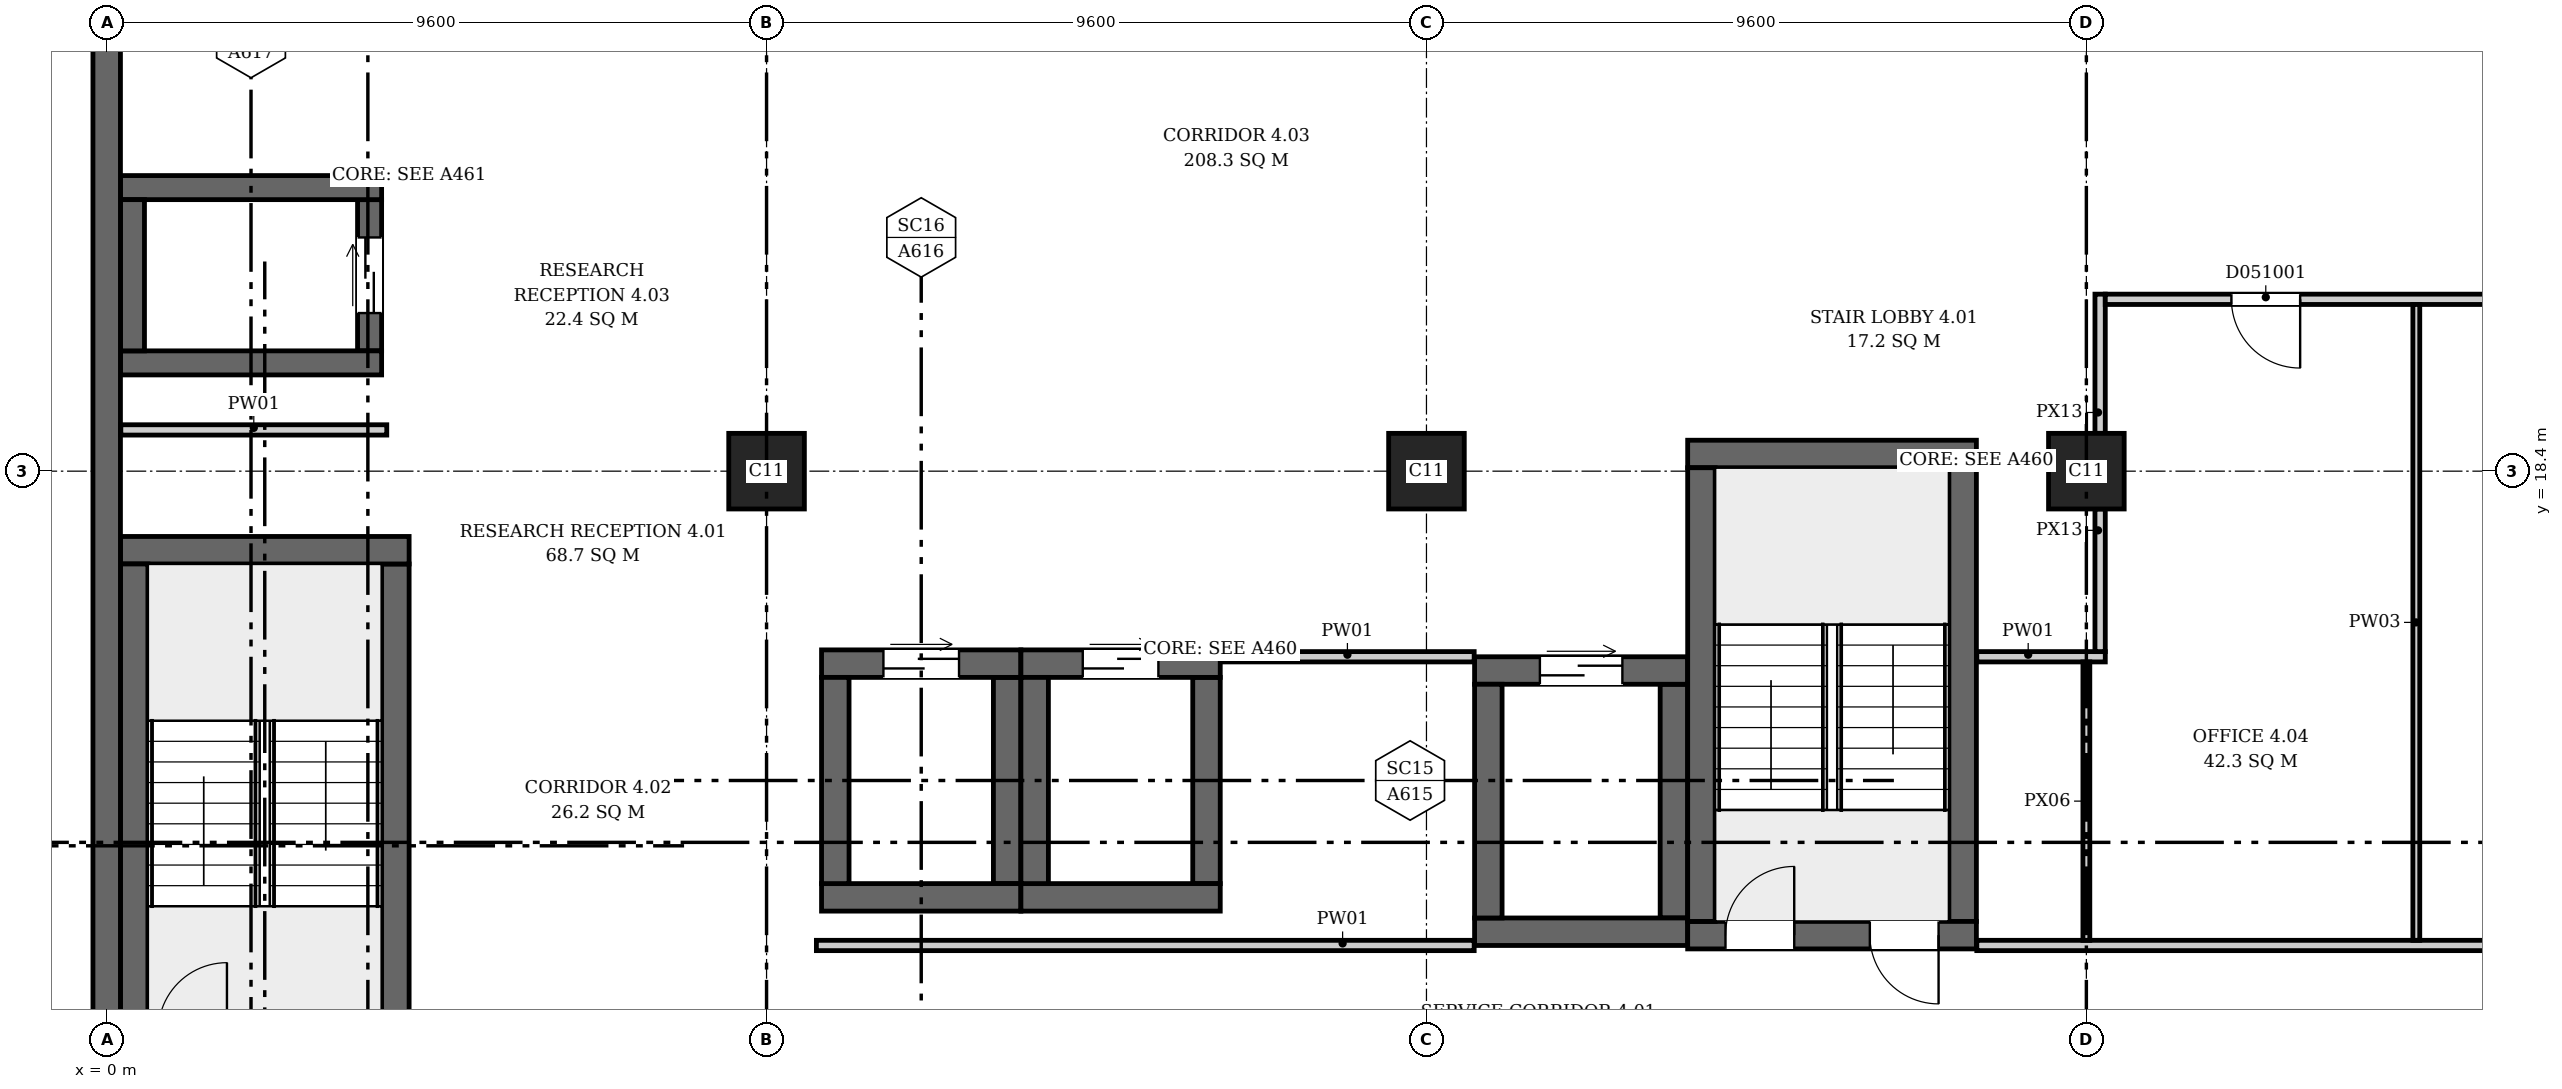
"""IFC4 building model, lengths in metres.
Left out: names, types, materials, properties, quantities, classifications, styles, units other than length and angle.
Written with IfcOpenShell. Run it as: python <this file> out.ifc"""

import sys

from ifc_helpers import new_model, si_unit, direction, frame, frame_2d, origin, origin_2d, place, context, subcontext, project, spatial, rectangle, extrude, element, fill, save


model = new_model("IFC4")
c1 = context("Model", 3, precision=1e-05, world=origin(), true_north=direction((0.0, 1.0)))
c2 = subcontext(c1, "Body", "Model", "MODEL_VIEW")
j1 = project(units=[si_unit("LENGTHUNIT", "METRE"), si_unit("PLANEANGLEUNIT", "RADIAN")], contexts=[c1])
p1 = place(None, origin())
s1 = spatial("IfcSite", under=j1, at=p1, CompositionType="ELEMENT")
p2 = place(p1, origin())
s2 = spatial("IfcBuilding", under=s1, at=p2, CompositionType="ELEMENT")
p3 = place(p2, frame((0.0, 0.0, 26.7)))
s3 = spatial("IfcBuildingStorey", under=s2, at=p3, CompositionType="ELEMENT", Elevation=26.7)
p4 = place(p3, frame((0.0, -0.2, 0.0), z_axis=(0.0, 0.0, 1.0), x_axis=(0.0, 1.0, 0.0)))
e1 = element("IfcWall", 1, at=p4, inside=s3, PredefinedType="SHEAR", context=c2, shape_type="SweptSolid", body=[
    extrude(rectangle(XDim=46.88, YDim=0.4, at=frame_2d((23.44, 0.0))), origin(), (0.0, 0.0, 1.0), 5.2),
])
p5 = place(p3, frame((0.2, 17.25, 0.0), z_axis=(0.0, 0.0, 1.0), x_axis=(1.0, 0.0, 0.0)))
e2 = element("IfcWall", 2, at=p5, inside=s3, PredefinedType="SHEAR", context=c2, shape_type="SweptSolid", body=[
    extrude(rectangle(XDim=4.2, YDim=0.4, at=frame_2d((2.1, 0.0))), origin(), (0.0, 0.0, 1.0), 5.2),
])
for number, where, z_axis, x_axis in (
    (3, (0.4, 10.45, 0.0), (0.0, 0.0, 1.0), (0.0, 1.0, 0.0)),
    (4, (4.2, 10.45, 0.0), (0.0, 0.0, 1.0), (0.0, 1.0, 0.0)),
):
    element("IfcWall", number, at=place(p3, frame(where, z_axis=z_axis, x_axis=x_axis)), inside=s3, PredefinedType="SHEAR", context=c2, shape_type="SweptSolid", body=[
        extrude(rectangle(XDim=6.6, YDim=0.4, at=frame_2d((3.3, 0.0))), origin(), (0.0, 0.0, 1.0), 5.2),
    ])
p6 = place(p3, frame((23.0, 11.65, 0.0), z_axis=(0.0, 0.0, 1.0), x_axis=(1.0, 0.0, 0.0)))
e5 = element("IfcWall", 5, at=p6, inside=s3, PredefinedType="SHEAR", context=c2, shape_type="SweptSolid", body=[
    extrude(rectangle(XDim=4.2, YDim=0.4, at=frame_2d((2.1, 0.0))), origin(), (0.0, 0.0, 1.0), 5.2),
])
p7 = place(p6, frame((0.55, 0.0, 0.0)))
e6 = element("IfcOpeningElement", 6, at=p7, cuts=e5, PredefinedType="OPENING", context=c2, shape_type="SweptSolid", body=[
    extrude(rectangle(XDim=1.0, YDim=2.1, at=frame_2d((0.5, 1.05))), frame((0.0, 0.21, 0.0), z_axis=(0.0, -1.0, 0.0), x_axis=(1.0, 0.0, 0.0)), (0.0, 0.0, 1.0), 0.42),
])
p8 = place(p6, frame((2.65, 0.0, 0.0)))
e7 = element("IfcOpeningElement", 7, at=p8, cuts=e5, PredefinedType="OPENING", context=c2, shape_type="SweptSolid", body=[
    extrude(rectangle(XDim=1.0, YDim=2.1, at=frame_2d((0.5, 1.05))), frame((0.0, 0.21, 0.0), z_axis=(0.0, -1.0, 0.0), x_axis=(1.0, 0.0, 0.0)), (0.0, 0.0, 1.0), 0.42),
])
p9 = place(p3, frame((23.0, 18.65, 0.0), z_axis=(0.0, 0.0, 1.0), x_axis=(1.0, 0.0, 0.0)))
e8 = element("IfcWall", 8, at=p9, inside=s3, PredefinedType="SHEAR", context=c2, shape_type="SweptSolid", body=[
    extrude(rectangle(XDim=4.2, YDim=0.4, at=frame_2d((2.1, 0.0))), origin(), (0.0, 0.0, 1.0), 5.2),
])
for number, where, z_axis, x_axis in (
    (9, (23.2, 11.85, 0.0), (0.0, 0.0, 1.0), (0.0, 1.0, 0.0)),
    (10, (27.0, 11.85, 0.0), (0.0, 0.0, 1.0), (0.0, 1.0, 0.0)),
):
    element("IfcWall", number, at=place(p3, frame(where, z_axis=z_axis, x_axis=x_axis)), inside=s3, PredefinedType="SHEAR", context=c2, shape_type="SweptSolid", body=[
        extrude(rectangle(XDim=6.6, YDim=0.4, at=frame_2d((3.3, 0.0))), origin(), (0.0, 0.0, 1.0), 5.2),
    ])
for number, where, z_axis, x_axis in (
    (11, (0.2, 19.975, 0.0), (0.0, 0.0, 1.0), (1.0, 0.0, 0.0)),
    (12, (0.2, 22.525, 0.0), (0.0, 0.0, 1.0), (1.0, 0.0, 0.0)),
):
    element("IfcWall", number, at=place(p3, frame(where, z_axis=z_axis, x_axis=x_axis)), inside=s3, PredefinedType="SHEAR", context=c2, shape_type="SweptSolid", body=[
        extrude(rectangle(XDim=3.8, YDim=0.35, at=frame_2d((1.9, 0.0))), origin(), (0.0, 0.0, 1.0), 5.2),
    ])
p10 = place(p3, frame((0.375, 20.15, 0.0), z_axis=(0.0, 0.0, 1.0), x_axis=(0.0, 1.0, 0.0)))
e13 = element("IfcWall", 13, at=p10, inside=s3, PredefinedType="SHEAR", context=c2, shape_type="SweptSolid", body=[
    extrude(rectangle(XDim=2.2, YDim=0.35, at=frame_2d((1.1, 0.0))), origin(), (0.0, 0.0, 1.0), 5.2),
])
p11 = place(p3, frame((3.825, 20.15, 0.0), z_axis=(0.0, 0.0, 1.0), x_axis=(0.0, 1.0, 0.0)))
e14 = element("IfcWall", 14, at=p11, inside=s3, PredefinedType="SHEAR", context=c2, shape_type="SweptSolid", body=[
    extrude(rectangle(XDim=2.2, YDim=0.35, at=frame_2d((1.1, 0.0))), origin(), (0.0, 0.0, 1.0), 5.2),
])
p12 = place(p11, frame((0.55, 0.0, 0.0)))
e15 = element("IfcOpeningElement", 15, at=p12, cuts=e14, PredefinedType="OPENING", context=c2, shape_type="SweptSolid", body=[
    extrude(rectangle(XDim=1.1, YDim=2.1, at=frame_2d((0.55, 1.05))), frame((0.0, 0.185, 0.0), z_axis=(0.0, -1.0, 0.0), x_axis=(1.0, 0.0, 0.0)), (0.0, 0.0, 1.0), 0.37),
])
p13 = place(p3, frame((10.4, 12.2, 0.0), z_axis=(0.0, 0.0, 1.0), x_axis=(1.0, 0.0, 0.0)))
e16 = element("IfcWall", 16, at=p13, inside=s3, PredefinedType="SHEAR", context=c2, shape_type="SweptSolid", body=[
    extrude(rectangle(XDim=2.9, YDim=0.4, at=frame_2d((1.45, 0.0))), origin(), (0.0, 0.0, 1.0), 5.2),
])
p14 = place(p3, frame((10.4, 15.6, 0.0), z_axis=(0.0, 0.0, 1.0), x_axis=(1.0, 0.0, 0.0)))
e17 = element("IfcWall", 17, at=p14, inside=s3, PredefinedType="SHEAR", context=c2, shape_type="SweptSolid", body=[
    extrude(rectangle(XDim=2.9, YDim=0.4, at=frame_2d((1.45, 0.0))), origin(), (0.0, 0.0, 1.0), 5.2),
])
p15 = place(p14, frame((0.9, 0.0, 0.0)))
e18 = element("IfcOpeningElement", 18, at=p15, cuts=e17, PredefinedType="OPENING", context=c2, shape_type="SweptSolid", body=[
    extrude(rectangle(XDim=1.1, YDim=2.1, at=frame_2d((0.55, 1.05))), frame((0.0, 0.21, 0.0), z_axis=(0.0, -1.0, 0.0), x_axis=(1.0, 0.0, 0.0)), (0.0, 0.0, 1.0), 0.42),
])
for number, where, z_axis, x_axis in (
    (19, (10.6, 12.4, 0.0), (0.0, 0.0, 1.0), (0.0, 1.0, 0.0)),
    (20, (13.1, 12.4, 0.0), (0.0, 0.0, 1.0), (0.0, 1.0, 0.0)),
):
    element("IfcWall", number, at=place(p3, frame(where, z_axis=z_axis, x_axis=x_axis)), inside=s3, PredefinedType="SHEAR", context=c2, shape_type="SweptSolid", body=[
        extrude(rectangle(XDim=3.0, YDim=0.4, at=frame_2d((1.5, 0.0))), origin(), (0.0, 0.0, 1.0), 5.2),
    ])
p16 = place(p3, frame((13.3, 12.2, 0.0), z_axis=(0.0, 0.0, 1.0), x_axis=(1.0, 0.0, 0.0)))
e21 = element("IfcWall", 21, at=p16, inside=s3, PredefinedType="SHEAR", context=c2, shape_type="SweptSolid", body=[
    extrude(rectangle(XDim=2.9, YDim=0.4, at=frame_2d((1.45, 0.0))), origin(), (0.0, 0.0, 1.0), 5.2),
])
p17 = place(p3, frame((13.3, 15.6, 0.0), z_axis=(0.0, 0.0, 1.0), x_axis=(1.0, 0.0, 0.0)))
e22 = element("IfcWall", 22, at=p17, inside=s3, PredefinedType="SHEAR", context=c2, shape_type="SweptSolid", body=[
    extrude(rectangle(XDim=2.9, YDim=0.4, at=frame_2d((1.45, 0.0))), origin(), (0.0, 0.0, 1.0), 5.2),
])
p18 = place(p17, frame((0.9, 0.0, 0.0)))
e23 = element("IfcOpeningElement", 23, at=p18, cuts=e22, PredefinedType="OPENING", context=c2, shape_type="SweptSolid", body=[
    extrude(rectangle(XDim=1.1, YDim=2.1, at=frame_2d((0.55, 1.05))), frame((0.0, 0.21, 0.0), z_axis=(0.0, -1.0, 0.0), x_axis=(1.0, 0.0, 0.0)), (0.0, 0.0, 1.0), 0.42),
])
for number, where, z_axis, x_axis in (
    (24, (13.5, 12.4, 0.0), (0.0, 0.0, 1.0), (0.0, 1.0, 0.0)),
    (25, (16.0, 12.4, 0.0), (0.0, 0.0, 1.0), (0.0, 1.0, 0.0)),
):
    element("IfcWall", number, at=place(p3, frame(where, z_axis=z_axis, x_axis=x_axis)), inside=s3, PredefinedType="SHEAR", context=c2, shape_type="SweptSolid", body=[
        extrude(rectangle(XDim=3.0, YDim=0.4, at=frame_2d((1.5, 0.0))), origin(), (0.0, 0.0, 1.0), 5.2),
    ])
p19 = place(p3, frame((19.9, 11.7, 0.0), z_axis=(0.0, 0.0, 1.0), x_axis=(1.0, 0.0, 0.0)))
e26 = element("IfcWall", 26, at=p19, inside=s3, PredefinedType="SHEAR", context=c2, shape_type="SweptSolid", body=[
    extrude(rectangle(XDim=3.1, YDim=0.4, at=frame_2d((1.55, 0.0))), origin(), (0.0, 0.0, 1.0), 5.2),
])
p20 = place(p3, frame((19.9, 15.5, 0.0), z_axis=(0.0, 0.0, 1.0), x_axis=(1.0, 0.0, 0.0)))
e27 = element("IfcWall", 27, at=p20, inside=s3, PredefinedType="SHEAR", context=c2, shape_type="SweptSolid", body=[
    extrude(rectangle(XDim=3.1, YDim=0.4, at=frame_2d((1.55, 0.0))), origin(), (0.0, 0.0, 1.0), 5.2),
])
p21 = place(p20, frame((0.95, 0.0, 0.0)))
e28 = element("IfcOpeningElement", 28, at=p21, cuts=e27, PredefinedType="OPENING", context=c2, shape_type="SweptSolid", body=[
    extrude(rectangle(XDim=1.2, YDim=2.1, at=frame_2d((0.6, 1.05))), frame((0.0, 0.21, 0.0), z_axis=(0.0, -1.0, 0.0), x_axis=(1.0, 0.0, 0.0)), (0.0, 0.0, 1.0), 0.42),
])
for number, where, z_axis, x_axis in (
    (29, (20.1, 11.9, 0.0), (0.0, 0.0, 1.0), (0.0, 1.0, 0.0)),
    (30, (22.8, 11.9, 0.0), (0.0, 0.0, 1.0), (0.0, 1.0, 0.0)),
):
    element("IfcWall", number, at=place(p3, frame(where, z_axis=z_axis, x_axis=x_axis)), inside=s3, PredefinedType="SHEAR", context=c2, shape_type="SweptSolid", body=[
        extrude(rectangle(XDim=3.4, YDim=0.4, at=frame_2d((1.7, 0.0))), origin(), (0.0, 0.0, 1.0), 5.2),
    ])
for number, where, z_axis, x_axis in (
    (31, (9.6, 18.4, 0.0), (0.0, 0.0, 1.0), (1.0, 0.0, 0.0)),
    (32, (19.2, 18.4, 0.0), (0.0, 0.0, 1.0), (1.0, 0.0, 0.0)),
    (33, (28.8, 18.4, 0.0), (0.0, 0.0, 1.0), (1.0, 0.0, 0.0)),
):
    element("IfcColumn", number, at=place(p3, frame(where, z_axis=z_axis, x_axis=x_axis)), inside=s3, PredefinedType="COLUMN", context=c2, shape_type="SweptSolid", body=[
        extrude(rectangle(XDim=1.1, YDim=1.1, at=origin_2d()), origin(), (0.0, 0.0, 1.0), 5.2),
    ])
p22 = place(p3, frame((0.206, 19.0, 0.0), z_axis=(0.0, 0.0, 1.0), x_axis=(1.0, 0.0, 0.0)))
e34 = element("IfcWall", 34, at=p22, inside=s3, PredefinedType="PARTITIONING", context=c2, shape_type="SweptSolid", body=[
    extrude(rectangle(XDim=3.869, YDim=0.15, at=frame_2d((1.935, 0.0))), origin(), (0.0, 0.0, 1.0), 4.85),
])
p23 = place(p3, frame((10.325, 11.5, 0.0), z_axis=(0.0, 0.0, 1.0), x_axis=(1.0, 0.0, 0.0)))
e35 = element("IfcWall", 35, at=p23, inside=s3, PredefinedType="PARTITIONING", context=c2, shape_type="SweptSolid", body=[
    extrude(rectangle(XDim=9.569, YDim=0.15, at=frame_2d((4.785, 0.0))), origin(), (0.0, 0.0, 1.0), 4.85),
])
p24 = place(p3, frame((16.206, 15.7, 0.0), z_axis=(0.0, 0.0, 1.0), x_axis=(1.0, 0.0, 0.0)))
e36 = element("IfcWall", 36, at=p24, inside=s3, PredefinedType="PARTITIONING", context=c2, shape_type="SweptSolid", body=[
    extrude(rectangle(XDim=3.688, YDim=0.15, at=frame_2d((1.844, 0.0))), origin(), (0.0, 0.0, 1.0), 4.85),
])
p25 = place(p3, frame((27.206, 11.5, 0.0), z_axis=(0.0, 0.0, 1.0), x_axis=(1.0, 0.0, 0.0)))
e37 = element("IfcWall", 37, at=p25, inside=s3, PredefinedType="PARTITIONING", context=c2, shape_type="SweptSolid", body=[
    extrude(rectangle(XDim=25.669, YDim=0.15, at=frame_2d((12.834, 0.0))), origin(), (0.0, 0.0, 1.0), 4.85),
])
p26 = place(p25, frame((13.094, 0.0, 0.0)))
e38 = element("IfcOpeningElement", 38, at=p26, cuts=e37, PredefinedType="OPENING", context=c2, shape_type="SweptSolid", body=[
    extrude(rectangle(XDim=1.0, YDim=2.1, at=frame_2d((0.5, 1.05))), frame((0.0, 0.085, 0.0), z_axis=(0.0, -1.0, 0.0), x_axis=(1.0, 0.0, 0.0)), (0.0, 0.0, 1.0), 0.17),
])
p27 = place(p25, frame((17.894, 0.0, 0.0)))
e39 = element("IfcOpeningElement", 39, at=p27, cuts=e37, PredefinedType="OPENING", context=c2, shape_type="SweptSolid", body=[
    extrude(rectangle(XDim=1.0, YDim=2.1, at=frame_2d((0.5, 1.05))), frame((0.0, 0.085, 0.0), z_axis=(0.0, -1.0, 0.0), x_axis=(1.0, 0.0, 0.0)), (0.0, 0.0, 1.0), 0.17),
])
p28 = place(p25, frame((22.659, 0.0, 0.0)))
e40 = element("IfcOpeningElement", 40, at=p28, cuts=e37, PredefinedType="OPENING", context=c2, shape_type="SweptSolid", body=[
    extrude(rectangle(XDim=1.0, YDim=2.1, at=frame_2d((0.5, 1.05))), frame((0.0, 0.085, 0.0), z_axis=(0.0, -1.0, 0.0), x_axis=(1.0, 0.0, 0.0)), (0.0, 0.0, 1.0), 0.17),
])
p29 = place(p3, frame((27.206, 15.7, 0.0), z_axis=(0.0, 0.0, 1.0), x_axis=(1.0, 0.0, 0.0)))
e41 = element("IfcWall", 41, at=p29, inside=s3, PredefinedType="PARTITIONING", context=c2, shape_type="SweptSolid", body=[
    extrude(rectangle(XDim=1.869, YDim=0.15, at=frame_2d((0.935, 0.0))), origin(), (0.0, 0.0, 1.0), 4.85),
])
p30 = place(p3, frame((28.8, 11.575, 0.0), z_axis=(0.0, 0.0, 1.0), x_axis=(0.0, 1.0, 0.0)))
e42 = element("IfcWall", 42, at=p30, inside=s3, PredefinedType="PARTITIONING", context=c2, shape_type="SweptSolid", body=[
    extrude(rectangle(XDim=4.05, YDim=0.1, at=frame_2d((2.025, 0.0))), origin(), (0.0, 0.0, 1.0), 4.45),
])
p31 = place(p3, frame((29.0, 15.775, 0.0), z_axis=(0.0, 0.0, 1.0), x_axis=(0.0, 1.0, 0.0)))
e43 = element("IfcWall", 43, at=p31, inside=s3, PredefinedType="PARTITIONING", context=c2, shape_type="SweptSolid", body=[
    extrude(rectangle(XDim=2.075, YDim=0.15, at=frame_2d((1.038, 0.0))), origin(), (0.0, 0.0, 1.0), 4.45),
])
p32 = place(p3, frame((29.0, 18.95, 0.0), z_axis=(0.0, 0.0, 1.0), x_axis=(0.0, 1.0, 0.0)))
e44 = element("IfcWall", 44, at=p32, inside=s3, PredefinedType="PARTITIONING", context=c2, shape_type="SweptSolid", body=[
    extrude(rectangle(XDim=2.025, YDim=0.15, at=frame_2d((1.013, 0.0))), origin(), (0.0, 0.0, 1.0), 4.45),
])
p33 = place(p3, frame((29.075, 20.9, 0.0), z_axis=(0.0, 0.0, 1.0), x_axis=(1.0, 0.0, 0.0)))
e45 = element("IfcWall", 45, at=p33, inside=s3, PredefinedType="PARTITIONING", context=c2, shape_type="SweptSolid", body=[
    extrude(rectangle(XDim=9.25, YDim=0.15, at=frame_2d((4.625, 0.0))), origin(), (0.0, 0.0, 1.0), 4.85),
])
p34 = place(p33, frame((1.835, 0.0, 0.0)))
e46 = element("IfcOpeningElement", 46, at=p34, cuts=e45, PredefinedType="OPENING", context=c2, shape_type="SweptSolid", body=[
    extrude(rectangle(XDim=1.0, YDim=2.1, at=frame_2d((0.5, 1.05))), frame((0.0, 0.085, 0.0), z_axis=(0.0, -1.0, 0.0), x_axis=(1.0, 0.0, 0.0)), (0.0, 0.0, 1.0), 0.17),
])
p35 = place(p33, frame((6.315, 0.0, 0.0)))
e47 = element("IfcOpeningElement", 47, at=p35, cuts=e45, PredefinedType="OPENING", context=c2, shape_type="SweptSolid", body=[
    extrude(rectangle(XDim=1.0, YDim=2.1, at=frame_2d((0.5, 1.05))), frame((0.0, 0.085, 0.0), z_axis=(0.0, -1.0, 0.0), x_axis=(1.0, 0.0, 0.0)), (0.0, 0.0, 1.0), 0.17),
])
p36 = place(p3, frame((33.6, 11.575, 0.0), z_axis=(0.0, 0.0, 1.0), x_axis=(0.0, 1.0, 0.0)))
e48 = element("IfcWall", 48, at=p36, inside=s3, PredefinedType="PARTITIONING", context=c2, shape_type="SweptSolid", body=[
    extrude(rectangle(XDim=9.25, YDim=0.1, at=frame_2d((4.625, 0.0))), origin(), (0.0, 0.0, 1.0), 4.85),
])
p37 = place(p7, origin())
e49 = element("IfcDoor", 49, at=p37, inside=s3, OperationType="SINGLE_SWING_RIGHT", PredefinedType="DOOR", context=c2, shape_type="SweptSolid", body=[
    extrude(rectangle(XDim=1.0, YDim=2.1, at=frame_2d((0.5, 1.05))), frame((0.0, 0.025, 0.0), z_axis=(0.0, -1.0, 0.0), x_axis=(1.0, 0.0, 0.0)), (0.0, 0.0, 1.0), 0.05),
])
fill(e6, e49)
p38 = place(p8, origin())
e50 = element("IfcDoor", 50, at=p38, inside=s3, OperationType="SINGLE_SWING_LEFT", PredefinedType="DOOR", context=c2, shape_type="SweptSolid", body=[
    extrude(rectangle(XDim=1.0, YDim=2.1, at=frame_2d((0.5, 1.05))), frame((0.0, 0.025, 0.0), z_axis=(0.0, -1.0, 0.0), x_axis=(1.0, 0.0, 0.0)), (0.0, 0.0, 1.0), 0.05),
])
fill(e7, e50)
p39 = place(p12, origin())
e51 = element("IfcDoor", 51, at=p39, inside=s3, OperationType="DOUBLE_DOOR_SLIDING", PredefinedType="DOOR", context=c2, shape_type="SweptSolid", body=[
    extrude(rectangle(XDim=1.1, YDim=2.1, at=frame_2d((0.55, 1.05))), frame((0.0, 0.025, 0.0), z_axis=(0.0, -1.0, 0.0), x_axis=(1.0, 0.0, 0.0)), (0.0, 0.0, 1.0), 0.05),
])
fill(e15, e51)
p40 = place(p15, origin())
e52 = element("IfcDoor", 52, at=p40, inside=s3, OperationType="DOUBLE_DOOR_SLIDING", PredefinedType="DOOR", context=c2, shape_type="SweptSolid", body=[
    extrude(rectangle(XDim=1.1, YDim=2.1, at=frame_2d((0.55, 1.05))), frame((0.0, 0.025, 0.0), z_axis=(0.0, -1.0, 0.0), x_axis=(1.0, 0.0, 0.0)), (0.0, 0.0, 1.0), 0.05),
])
fill(e18, e52)
p41 = place(p18, origin())
e53 = element("IfcDoor", 53, at=p41, inside=s3, OperationType="DOUBLE_DOOR_SLIDING", PredefinedType="DOOR", context=c2, shape_type="SweptSolid", body=[
    extrude(rectangle(XDim=1.1, YDim=2.1, at=frame_2d((0.55, 1.05))), frame((0.0, 0.025, 0.0), z_axis=(0.0, -1.0, 0.0), x_axis=(1.0, 0.0, 0.0)), (0.0, 0.0, 1.0), 0.05),
])
fill(e23, e53)
p42 = place(p21, origin())
e54 = element("IfcDoor", 54, at=p42, inside=s3, OperationType="DOUBLE_DOOR_SLIDING", PredefinedType="DOOR", context=c2, shape_type="SweptSolid", body=[
    extrude(rectangle(XDim=1.2, YDim=2.1, at=frame_2d((0.6, 1.05))), frame((0.0, 0.025, 0.0), z_axis=(0.0, -1.0, 0.0), x_axis=(1.0, 0.0, 0.0)), (0.0, 0.0, 1.0), 0.05),
])
fill(e28, e54)
p43 = place(p34, origin())
e55 = element("IfcDoor", 55, at=p43, inside=s3, OperationType="SINGLE_SWING_RIGHT", PredefinedType="DOOR", context=c2, shape_type="SweptSolid", body=[
    extrude(rectangle(XDim=1.0, YDim=2.1, at=frame_2d((0.5, 1.05))), frame((0.0, 0.025, 0.0), z_axis=(0.0, -1.0, 0.0), x_axis=(1.0, 0.0, 0.0)), (0.0, 0.0, 1.0), 0.05),
])
fill(e46, e55)
save(model, sys.argv[1])
